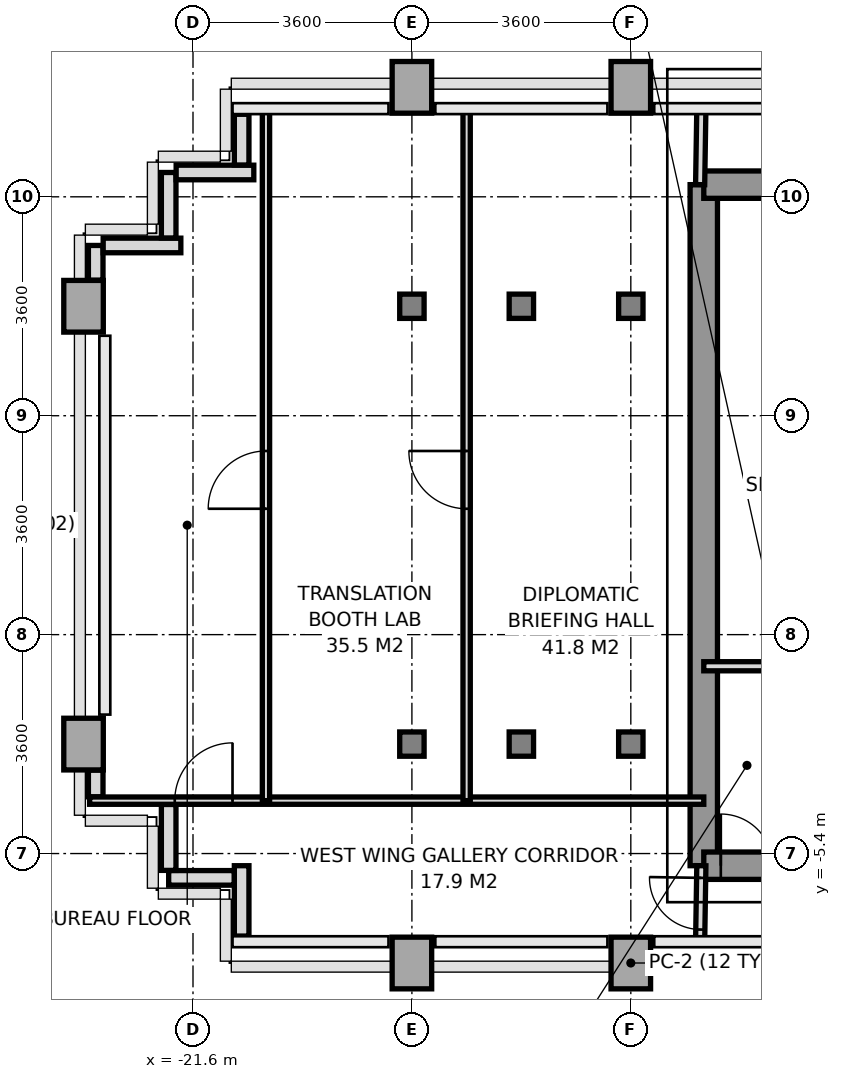
"""IFC4 building model, lengths in metres.
Left out: names, types, materials, properties, quantities, classifications, styles, units other than length and angle.
Written with IfcOpenShell. Run it as: python <this file> out.ifc"""

import sys

from ifc_helpers import new_model, si_unit, direction, frame, frame_2d, origin, origin_2d, place, context, subcontext, project, spatial, rectangle, i_section, extrude, source, transform, mapped, element, fill, save


model = new_model("IFC4")
c1 = context("Model", 3, precision=1e-05, world=origin(), true_north=direction((0.0, 1.0)))
c2 = subcontext(c1, "Body", "Model", "MODEL_VIEW")
j1 = project(units=[si_unit("LENGTHUNIT", "METRE"), si_unit("PLANEANGLEUNIT", "RADIAN")], contexts=[c1])
p1 = place(None, origin())
s1 = spatial("IfcSite", under=j1, at=p1, CompositionType="ELEMENT")
p2 = place(p1, origin())
s2 = spatial("IfcBuilding", under=s1, at=p2, CompositionType="ELEMENT")
p3 = place(p2, frame((0.0, 0.0, 124.4)))
s3 = spatial("IfcBuildingStorey", under=s2, at=p3, CompositionType="ELEMENT", Elevation=124.4)
m1 = source(origin(), c2, "Body", "SweptSolid", [
    extrude(rectangle(XDim=0.65, YDim=0.85, at=origin_2d()), origin(), (0.0, 0.0, 1.0), 3.2),
])
for number, where, z_axis, x_axis in (
    (1, (-23.4, -3.6, 0.0), (0.0, 0.0, 1.0), (1.0, 0.0, 0.0)),
    (2, (-23.4, 3.6, 0.0), (0.0, 0.0, 1.0), (1.0, 0.0, 0.0)),
    (3, (-18.0, -7.2, 0.0), (0.0, 0.0, 1.0), (1.0, 0.0, 0.0)),
):
    element("IfcColumn", number, at=place(p3, frame(where, z_axis=z_axis, x_axis=x_axis)), inside=s3, PredefinedType="COLUMN", context=c2, shape_type="MappedRepresentation", body=[
        mapped(m1, transform((0.0, 0.0, 0.0), x_axis=(1.0, 0.0, 0.0), y_axis=(0.0, 1.0, 0.0), z_axis=(0.0, 0.0, 1.0), scale=1.0)),
    ])
m2 = source(origin(), c2, "Body", "SweptSolid", [
    extrude(i_section(OverallWidth=0.401, OverallDepth=0.399, WebThickness=0.02, FlangeThickness=0.032, at=origin_2d()), origin(), (0.0, 0.0, 1.0), 3.2),
])
for number, where, z_axis, x_axis in (
    (4, (-18.0, -3.6, 0.0), (0.0, 0.0, 1.0), (1.0, 0.0, 0.0)),
    (5, (-18.0, 3.6, 0.0), (0.0, 0.0, 1.0), (1.0, 0.0, 0.0)),
):
    element("IfcColumn", number, at=place(p3, frame(where, z_axis=z_axis, x_axis=x_axis)), inside=s3, PredefinedType="COLUMN", context=c2, shape_type="MappedRepresentation", body=[
        mapped(m2, transform((0.0, 0.0, 0.0), x_axis=(1.0, 0.0, 0.0), y_axis=(0.0, 1.0, 0.0), z_axis=(0.0, 0.0, 1.0), scale=1.0)),
    ])
p4 = place(p3, frame((-18.0, 7.2, 0.0), z_axis=(0.0, 0.0, 1.0), x_axis=(1.0, 0.0, 0.0)))
e6 = element("IfcColumn", 6, at=p4, inside=s3, PredefinedType="COLUMN", context=c2, shape_type="MappedRepresentation", body=[
    mapped(m1, transform((0.0, 0.0, 0.0), x_axis=(1.0, 0.0, 0.0), y_axis=(0.0, 1.0, 0.0), z_axis=(0.0, 0.0, 1.0), scale=1.0)),
])
for number, where, z_axis, x_axis in (
    (7, (-16.2, -3.6, 0.0), (0.0, 0.0, 1.0), (1.0, 0.0, 0.0)),
    (8, (-16.2, 3.6, 0.0), (0.0, 0.0, 1.0), (1.0, 0.0, 0.0)),
):
    element("IfcColumn", number, at=place(p3, frame(where, z_axis=z_axis, x_axis=x_axis)), inside=s3, PredefinedType="COLUMN", context=c2, shape_type="MappedRepresentation", body=[
        mapped(m2, transform((0.0, 0.0, 0.0), x_axis=(1.0, 0.0, 0.0), y_axis=(0.0, 1.0, 0.0), z_axis=(0.0, 0.0, 1.0), scale=1.0)),
    ])
p5 = place(p3, frame((-14.4, -7.2, 0.0), z_axis=(0.0, 0.0, 1.0), x_axis=(1.0, 0.0, 0.0)))
e9 = element("IfcColumn", 9, at=p5, inside=s3, PredefinedType="COLUMN", context=c2, shape_type="MappedRepresentation", body=[
    mapped(m1, transform((0.0, 0.0, 0.0), x_axis=(1.0, 0.0, 0.0), y_axis=(0.0, 1.0, 0.0), z_axis=(0.0, 0.0, 1.0), scale=1.0)),
])
for number, where, z_axis, x_axis in (
    (10, (-14.4, -3.6, 0.0), (0.0, 0.0, 1.0), (1.0, 0.0, 0.0)),
    (11, (-14.4, 3.6, 0.0), (0.0, 0.0, 1.0), (1.0, 0.0, 0.0)),
):
    element("IfcColumn", number, at=place(p3, frame(where, z_axis=z_axis, x_axis=x_axis)), inside=s3, PredefinedType="COLUMN", context=c2, shape_type="MappedRepresentation", body=[
        mapped(m2, transform((0.0, 0.0, 0.0), x_axis=(1.0, 0.0, 0.0), y_axis=(0.0, 1.0, 0.0), z_axis=(0.0, 0.0, 1.0), scale=1.0)),
    ])
p6 = place(p3, frame((-14.4, 7.2, 0.0), z_axis=(0.0, 0.0, 1.0), x_axis=(1.0, 0.0, 0.0)))
e12 = element("IfcColumn", 12, at=p6, inside=s3, PredefinedType="COLUMN", context=c2, shape_type="MappedRepresentation", body=[
    mapped(m1, transform((0.0, 0.0, 0.0), x_axis=(1.0, 0.0, 0.0), y_axis=(0.0, 1.0, 0.0), z_axis=(0.0, 0.0, 1.0), scale=1.0)),
])
p7 = place(p3, frame((-20.8, -6.757, 0.0), z_axis=(0.0, 0.0, 1.0), x_axis=(0.0, 1.0, 0.0)))
e13 = element("IfcWall", 13, at=p7, inside=s3, PredefinedType="PARAPET", context=c2, shape_type="SweptSolid", body=[
    extrude(rectangle(XDim=1.157, YDim=0.24, at=frame_2d((0.579, 0.0))), origin(), (0.0, 0.0, 1.0), 1.15),
])
p8 = place(p3, frame((-20.923, -5.8, 0.0), z_axis=(0.0, 0.0, 1.0), x_axis=(-1.0, 0.0, 0.0)))
e14 = element("IfcWall", 14, at=p8, inside=s3, PredefinedType="PARAPET", context=c2, shape_type="SweptSolid", body=[
    extrude(rectangle(XDim=1.077, YDim=0.24, at=frame_2d((0.539, 0.0))), origin(), (0.0, 0.0, 1.0), 1.15),
])
p9 = place(p3, frame((-22.0, -5.677, 0.0), z_axis=(0.0, 0.0, 1.0), x_axis=(0.0, 1.0, 0.0)))
e15 = element("IfcWall", 15, at=p9, inside=s3, PredefinedType="PARAPET", context=c2, shape_type="SweptSolid", body=[
    extrude(rectangle(XDim=1.084, YDim=0.24, at=frame_2d((0.542, 0.0))), origin(), (0.0, 0.0, 1.0), 1.15),
])
p10 = place(p3, frame((-23.2, -4.467, 0.0), z_axis=(0.0, 0.0, 1.0), x_axis=(0.0, 1.0, 0.0)))
e16 = element("IfcWall", 16, at=p10, inside=s3, PredefinedType="PARAPET", context=c2, shape_type="SweptSolid", body=[
    extrude(rectangle(XDim=0.439, YDim=0.24, at=frame_2d((0.219, 0.0))), origin(), (0.0, 0.0, 1.0), 1.15),
])
p11 = place(p3, frame((-23.2, 4.028, 0.0), z_axis=(0.0, 0.0, 1.0), x_axis=(0.0, 1.0, 0.0)))
e17 = element("IfcWall", 17, at=p11, inside=s3, PredefinedType="PARAPET", context=c2, shape_type="SweptSolid", body=[
    extrude(rectangle(XDim=0.572, YDim=0.24, at=frame_2d((0.286, 0.0))), origin(), (0.0, 0.0, 1.0), 1.15),
])
p12 = place(p3, frame((-23.077, 4.6, 0.0), z_axis=(0.0, 0.0, 1.0), x_axis=(1.0, 0.0, 0.0)))
e18 = element("IfcWall", 18, at=p12, inside=s3, PredefinedType="PARAPET", context=c2, shape_type="SweptSolid", body=[
    extrude(rectangle(XDim=1.277, YDim=0.24, at=frame_2d((0.638, 0.0))), origin(), (0.0, 0.0, 1.0), 1.15),
])
p13 = place(p3, frame((-22.0, 4.723, 0.0), z_axis=(0.0, 0.0, 1.0), x_axis=(0.0, 1.0, 0.0)))
e19 = element("IfcWall", 19, at=p13, inside=s3, PredefinedType="PARAPET", context=c2, shape_type="SweptSolid", body=[
    extrude(rectangle(XDim=1.077, YDim=0.24, at=frame_2d((0.539, 0.0))), origin(), (0.0, 0.0, 1.0), 1.15),
])
p14 = place(p3, frame((-21.877, 5.8, 0.0), z_axis=(0.0, 0.0, 1.0), x_axis=(1.0, 0.0, 0.0)))
e20 = element("IfcWall", 20, at=p14, inside=s3, PredefinedType="PARAPET", context=c2, shape_type="SweptSolid", body=[
    extrude(rectangle(XDim=1.277, YDim=0.24, at=frame_2d((0.638, 0.0))), origin(), (0.0, 0.0, 1.0), 1.15),
])
p15 = place(p3, frame((-20.8, 5.923, 0.0), z_axis=(0.0, 0.0, 1.0), x_axis=(0.0, 1.0, 0.0)))
e21 = element("IfcWall", 21, at=p15, inside=s3, PredefinedType="PARAPET", context=c2, shape_type="SweptSolid", body=[
    extrude(rectangle(XDim=0.834, YDim=0.24, at=frame_2d((0.417, 0.0))), origin(), (0.0, 0.0, 1.0), 1.15),
])
p16 = place(p3, frame((-13.2, -5.6, 0.0), z_axis=(0.0, 0.0, 1.0), x_axis=(0.0, 1.0, 0.0)))
e22 = element("IfcWall", 22, at=p16, inside=s3, PredefinedType="SHEAR", context=c2, shape_type="SweptSolid", body=[
    extrude(rectangle(XDim=11.2, YDim=0.45, at=frame_2d((5.6, 0.0))), origin(), (0.0, 0.0, 1.0), 3.2),
])
p17 = place(p3, frame((-13.2, 5.6, 0.0), z_axis=(0.0, 0.0, 1.0), x_axis=(1.0, 0.0, 0.0)))
e23 = element("IfcWall", 23, at=p17, inside=s3, PredefinedType="SHEAR", context=c2, shape_type="SweptSolid", body=[
    extrude(rectangle(XDim=1.819, YDim=0.45, at=frame_2d((0.909, 0.0))), origin(), (0.0, 0.0, 1.0), 3.2),
])
p18 = place(p3, frame((-13.2, -5.6, 0.0), z_axis=(0.0, 0.0, 1.0), x_axis=(1.0, 0.0, 0.0)))
e24 = element("IfcWall", 24, at=p18, inside=s3, PredefinedType="SHEAR", context=c2, shape_type="SweptSolid", body=[
    extrude(rectangle(XDim=7.8, YDim=0.45, at=frame_2d((3.9, 0.0))), origin(), (0.0, 0.0, 1.0), 3.2),
])
p19 = place(p18, frame((3.6, 0.0, 0.0)))
e25 = element("IfcOpeningElement", 25, at=p19, cuts=e24, PredefinedType="OPENING", context=c2, shape_type="SweptSolid", body=[
    extrude(rectangle(XDim=1.2, YDim=2.2, at=frame_2d((0.6, 1.1))), frame((0.0, 0.235, 0.0), z_axis=(0.0, -1.0, 0.0), x_axis=(1.0, 0.0, 0.0)), (0.0, 0.0, 1.0), 0.47),
])
p20 = place(p18, frame((0.28, 0.0, 0.0)))
e26 = element("IfcOpeningElement", 26, at=p20, cuts=e24, PredefinedType="OPENING", context=c2, shape_type="SweptSolid", body=[
    extrude(rectangle(XDim=0.85, YDim=2.1, at=frame_2d((0.425, 1.05))), frame((0.0, 0.235, 0.0), z_axis=(0.0, -1.0, 0.0), x_axis=(1.0, 0.0, 0.0)), (0.0, 0.0, 1.0), 0.47),
])
p21 = place(p18, frame((1.36, 0.0, 0.0)))
e27 = element("IfcOpeningElement", 27, at=p21, cuts=e24, PredefinedType="OPENING", context=c2, shape_type="SweptSolid", body=[
    extrude(rectangle(XDim=0.85, YDim=2.1, at=frame_2d((0.425, 1.05))), frame((0.0, 0.235, 0.0), z_axis=(0.0, -1.0, 0.0), x_axis=(1.0, 0.0, 0.0)), (0.0, 0.0, 1.0), 0.47),
])
p22 = place(p3, frame((-13.2, -2.32, 0.0), z_axis=(0.0, 0.0, 1.0), x_axis=(1.0, 0.0, 0.0)))
e28 = element("IfcWall", 28, at=p22, inside=s3, PredefinedType="PARTITIONING", context=c2, shape_type="SweptSolid", body=[
    extrude(rectangle(XDim=2.18, YDim=0.15, at=frame_2d((1.09, 0.0))), origin(), (0.0, 0.0, 1.0), 3.2),
])
p23 = place(p3, frame((-13.26, 5.6, 0.0), z_axis=(0.0, 0.0, 1.0), x_axis=(0.016013571389, 0.999871774545, 0.0)))
e29 = element("IfcWall", 29, at=p23, inside=s3, PredefinedType="PARTITIONING", context=c2, shape_type="SweptSolid", body=[
    extrude(rectangle(XDim=1.25, YDim=0.15, at=frame_2d((0.625, 0.0))), origin(), (0.0, 0.0, 1.0), 3.2),
])
p24 = place(p3, frame((-13.26, -6.85, 0.0), z_axis=(0.0, 0.0, 1.0), x_axis=(0.016013571389, 0.999871774545, 0.0)))
e30 = element("IfcWall", 30, at=p24, inside=s3, PredefinedType="PARTITIONING", context=c2, shape_type="SweptSolid", body=[
    extrude(rectangle(XDim=1.25, YDim=0.15, at=frame_2d((0.625, 0.0))), origin(), (0.0, 0.0, 1.0), 3.2),
])
p25 = place(p24, frame((0.2, 0.0, 0.0)))
e31 = element("IfcOpeningElement", 31, at=p25, cuts=e30, PredefinedType="OPENING", context=c2, shape_type="SweptSolid", body=[
    extrude(rectangle(XDim=0.85, YDim=2.1, at=frame_2d((0.425, 1.05))), frame((0.0, 0.085, 0.0), z_axis=(0.0, -1.0, 0.0), x_axis=(1.0, 0.0, 0.0)), (0.0, 0.0, 1.0), 0.17),
])
p26 = place(p3, frame((-23.3, -4.53, 0.0), z_axis=(0.0, 0.0, 1.0), x_axis=(1.0, 0.0, 0.0)))
e32 = element("IfcWall", 32, at=p26, inside=s3, PredefinedType="PARTITIONING", context=c2, shape_type="SweptSolid", body=[
    extrude(rectangle(XDim=10.1, YDim=0.12, at=frame_2d((5.05, 0.0))), origin(), (0.0, 0.0, 1.0), 2.76),
])
p27 = place(p26, frame((1.4, 0.0, 0.0)))
e33 = element("IfcOpeningElement", 33, at=p27, cuts=e32, PredefinedType="OPENING", context=c2, shape_type="SweptSolid", body=[
    extrude(rectangle(XDim=0.95, YDim=2.15, at=frame_2d((0.475, 1.075))), frame((0.0, 0.07, 0.0), z_axis=(0.0, -1.0, 0.0), x_axis=(1.0, 0.0, 0.0)), (0.0, 0.0, 1.0), 0.14),
])
p28 = place(p3, frame((-20.4, -4.53, 0.0), z_axis=(0.0, 0.0, 1.0), x_axis=(0.0, 1.0, 0.0)))
e34 = element("IfcWall", 34, at=p28, inside=s3, PredefinedType="PARTITIONING", context=c2, shape_type="SweptSolid", body=[
    extrude(rectangle(XDim=11.38, YDim=0.12, at=frame_2d((5.69, 0.0))), origin(), (0.0, 0.0, 1.0), 2.7),
])
p29 = place(p28, frame((4.8, 0.0, 0.0)))
e35 = element("IfcOpeningElement", 35, at=p29, cuts=e34, PredefinedType="OPENING", context=c2, shape_type="SweptSolid", body=[
    extrude(rectangle(XDim=0.95, YDim=2.15, at=frame_2d((0.475, 1.075))), frame((0.0, 0.07, 0.0), z_axis=(0.0, -1.0, 0.0), x_axis=(1.0, 0.0, 0.0)), (0.0, 0.0, 1.0), 0.14),
])
p30 = place(p3, frame((-17.1, -4.53, 0.0), z_axis=(0.0, 0.0, 1.0), x_axis=(0.0, 1.0, 0.0)))
e36 = element("IfcWall", 36, at=p30, inside=s3, PredefinedType="PARTITIONING", context=c2, shape_type="SweptSolid", body=[
    extrude(rectangle(XDim=11.38, YDim=0.12, at=frame_2d((5.69, 0.0))), origin(), (0.0, 0.0, 1.0), 2.7),
])
p31 = place(p30, frame((4.8, 0.0, 0.0)))
e37 = element("IfcOpeningElement", 37, at=p31, cuts=e36, PredefinedType="OPENING", context=c2, shape_type="SweptSolid", body=[
    extrude(rectangle(XDim=0.95, YDim=2.15, at=frame_2d((0.475, 1.075))), frame((0.0, 0.07, 0.0), z_axis=(0.0, -1.0, 0.0), x_axis=(1.0, 0.0, 0.0)), (0.0, 0.0, 1.0), 0.14),
])
m3 = source(origin(), c2, "Body", "SweptSolid", [
    extrude(rectangle(XDim=0.85, YDim=2.1, at=frame_2d((0.425, 1.05))), frame((0.0, 0.025, 0.0), z_axis=(0.0, -1.0, 0.0), x_axis=(1.0, 0.0, 0.0)), (0.0, 0.0, 1.0), 0.05),
])
p32 = place(p20, origin())
e38 = element("IfcDoor", 38, at=p32, inside=s3, OperationType="SINGLE_SWING_LEFT", PredefinedType="DOOR", context=c2, shape_type="MappedRepresentation", body=[
    mapped(m3, transform((0.0, 0.0, 0.0), x_axis=(1.0, 0.0, 0.0), y_axis=(0.0, 1.0, 0.0), z_axis=(0.0, 0.0, 1.0), scale=1.0)),
])
fill(e26, e38)
p33 = place(p25, origin())
e39 = element("IfcDoor", 39, at=p33, inside=s3, OperationType="SINGLE_SWING_RIGHT", PredefinedType="DOOR", context=c2, shape_type="MappedRepresentation", body=[
    mapped(m3, transform((0.0, 0.0, 0.0), x_axis=(1.0, 0.0, 0.0), y_axis=(0.0, 1.0, 0.0), z_axis=(0.0, 0.0, 1.0), scale=1.0)),
])
fill(e31, e39)
m4 = source(origin(), c2, "Body", "SweptSolid", [
    extrude(rectangle(XDim=0.95, YDim=2.15, at=frame_2d((0.475, 1.075))), frame((0.0, 0.025, 0.0), z_axis=(0.0, -1.0, 0.0), x_axis=(1.0, 0.0, 0.0)), (0.0, 0.0, 1.0), 0.05),
])
p34 = place(p27, origin())
e40 = element("IfcDoor", 40, at=p34, inside=s3, OperationType="SINGLE_SWING_RIGHT", PredefinedType="DOOR", context=c2, shape_type="MappedRepresentation", body=[
    mapped(m4, transform((0.0, 0.0, 0.0), x_axis=(1.0, 0.0, 0.0), y_axis=(0.0, 1.0, 0.0), z_axis=(0.0, 0.0, 1.0), scale=1.0)),
])
fill(e33, e40)
p35 = place(p29, origin())
e41 = element("IfcDoor", 41, at=p35, inside=s3, OperationType="SINGLE_SWING_LEFT", PredefinedType="DOOR", context=c2, shape_type="MappedRepresentation", body=[
    mapped(m4, transform((0.0, 0.0, 0.0), x_axis=(1.0, 0.0, 0.0), y_axis=(0.0, 1.0, 0.0), z_axis=(0.0, 0.0, 1.0), scale=1.0)),
])
fill(e35, e41)
p36 = place(p31, origin())
e42 = element("IfcDoor", 42, at=p36, inside=s3, OperationType="SINGLE_SWING_RIGHT", PredefinedType="DOOR", context=c2, shape_type="MappedRepresentation", body=[
    mapped(m4, transform((0.0, 0.0, 0.0), x_axis=(1.0, 0.0, 0.0), y_axis=(0.0, 1.0, 0.0), z_axis=(0.0, 0.0, 1.0), scale=1.0)),
])
fill(e37, e42)
save(model, sys.argv[1])
